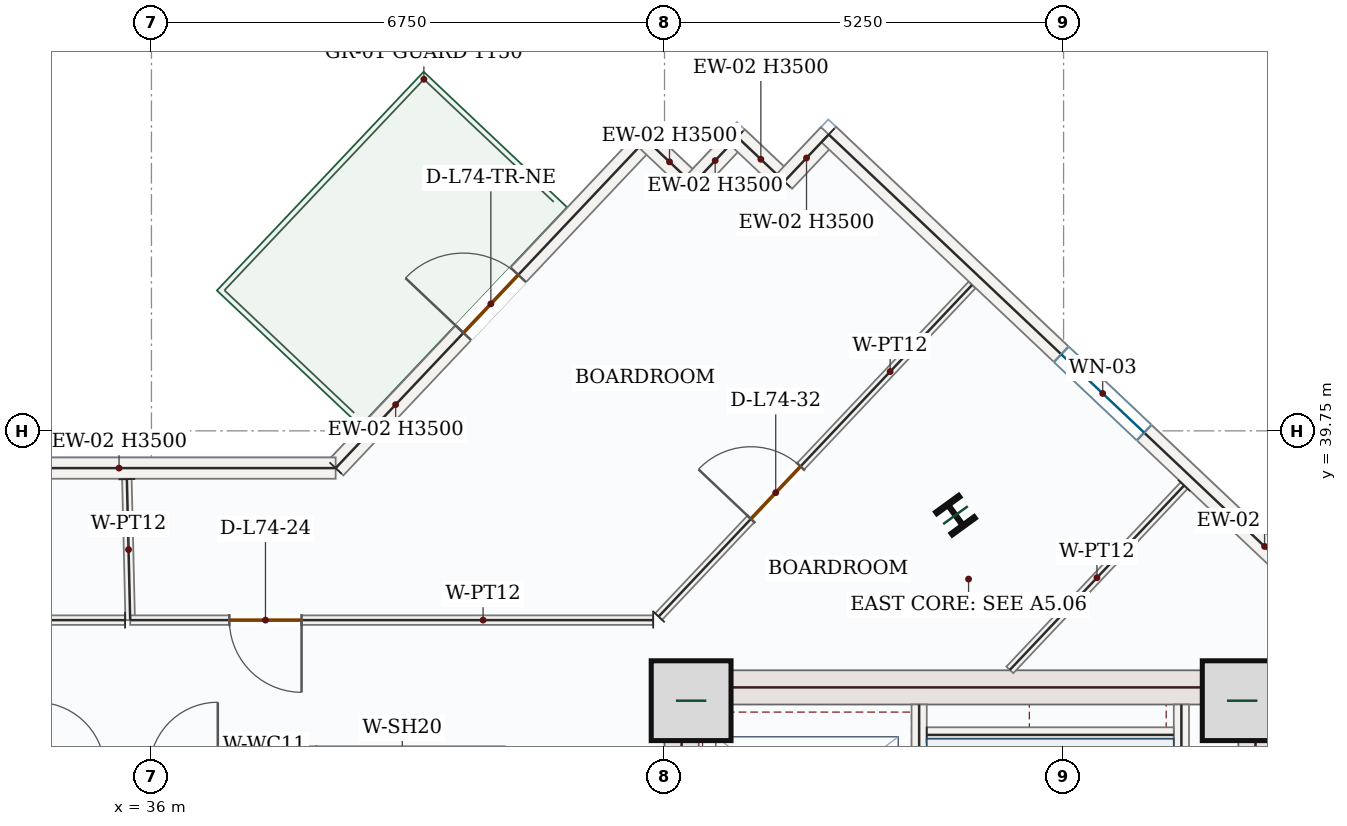
"""IFC4 building model, lengths in metres.
Left out: names, types, materials, properties, quantities, classifications, styles, units other than length and angle.
Written with IfcOpenShell. Run it as: python <this file> out.ifc"""

import sys

from ifc_helpers import new_model, si_unit, direction, frame, frame_2d, origin, origin_2d, place, context, subcontext, project, spatial, rectangle, i_section, extrude, source, transform, mapped, element, fill, save


model = new_model("IFC4")
c1 = context("Model", 3, precision=1e-05, world=origin(), true_north=direction((0.0, 1.0)))
c2 = subcontext(c1, "Body", "Model", "MODEL_VIEW")
j1 = project(units=[si_unit("LENGTHUNIT", "METRE"), si_unit("PLANEANGLEUNIT", "RADIAN")], contexts=[c1])
p1 = place(None, origin())
s1 = spatial("IfcSite", under=j1, at=p1, CompositionType="ELEMENT")
p2 = place(p1, origin())
s2 = spatial("IfcBuilding", under=s1, at=p2, CompositionType="ELEMENT")
p3 = place(p2, frame((0.0, 0.0, 306.6)))
s3 = spatial("IfcBuildingStorey", under=s2, at=p3, CompositionType="ELEMENT", Elevation=306.6)
p4 = place(p3, frame((42.975, 28.05, 0.0), z_axis=(0.0, 0.0, 1.0), x_axis=(0.0, 1.0, 0.0)))
e1 = element("IfcWall", 1, at=p4, inside=s3, PredefinedType="SHEAR", context=c2, shape_type="SweptSolid", body=[
    extrude(rectangle(XDim=8.55, YDim=0.45, at=frame_2d((4.275, 0.0))), origin(), (0.0, 0.0, 1.0), 3.5),
])
p5 = place(p4, frame((1.5, 0.0, 0.0)))
e2 = element("IfcOpeningElement", 2, at=p5, cuts=e1, PredefinedType="OPENING", context=c2, shape_type="SweptSolid", body=[
    extrude(rectangle(XDim=1.1, YDim=2.2, at=frame_2d((0.55, 1.1))), frame((0.0, 0.235, 0.0), z_axis=(0.0, -1.0, 0.0), x_axis=(1.0, 0.0, 0.0)), (0.0, 0.0, 1.0), 0.47),
])
m1 = source(origin(), c2, "Body", "SweptSolid", [
    extrude(rectangle(XDim=8.55, YDim=0.45, at=frame_2d((4.275, 0.0))), origin(), (0.0, 0.0, 1.0), 3.5),
])
p6 = place(p3, frame((50.525, 28.05, 0.0), z_axis=(0.0, 0.0, 1.0), x_axis=(0.0, 1.0, 0.0)))
e3 = element("IfcWall", 3, at=p6, inside=s3, PredefinedType="SHEAR", context=c2, shape_type="MappedRepresentation", body=[
    mapped(m1, transform((0.0, 0.0, 0.0), x_axis=(1.0, 0.0, 0.0), y_axis=(0.0, 1.0, 0.0), z_axis=(0.0, 0.0, 1.0), scale=1.0)),
])
m2 = source(origin(), c2, "Body", "SweptSolid", [
    extrude(rectangle(XDim=7.1, YDim=0.45, at=frame_2d((3.55, 0.0))), origin(), (0.0, 0.0, 1.0), 3.5),
])
p7 = place(p3, frame((43.2, 36.375, 0.0), z_axis=(0.0, 0.0, 1.0), x_axis=(1.0, 0.0, 0.0)))
e4 = element("IfcWall", 4, at=p7, inside=s3, PredefinedType="SHEAR", context=c2, shape_type="MappedRepresentation", body=[
    mapped(m2, transform((0.0, 0.0, 0.0), x_axis=(1.0, 0.0, 0.0), y_axis=(0.0, 1.0, 0.0), z_axis=(0.0, 0.0, 1.0), scale=1.0)),
])
m3 = source(origin(), c2, "Body", "SweptSolid", [
    extrude(rectangle(XDim=1.05, YDim=1.05, at=origin_2d()), origin(), (0.0, 0.0, 1.0), 3.75),
])
for number, where, z_axis, x_axis in (
    (5, (43.1, 36.2, 0.0), (0.0, 0.0, 1.0), (1.0, 0.0, 0.0)),
    (6, (50.35, 36.2, 0.0), (0.0, 0.0, 1.0), (1.0, 0.0, 0.0)),
):
    element("IfcColumn", number, at=place(p3, frame(where, z_axis=z_axis, x_axis=x_axis)), inside=s3, PredefinedType="COLUMN", context=c2, shape_type="MappedRepresentation", body=[
        mapped(m3, transform((0.0, 0.0, 0.0), x_axis=(1.0, 0.0, 0.0), y_axis=(0.0, 1.0, 0.0), z_axis=(0.0, 0.0, 1.0), scale=1.0)),
    ])
m4 = source(origin(), c2, "Body", "SweptSolid", [
    extrude(i_section(OverallWidth=0.374, OverallDepth=0.372, WebThickness=0.016, FlangeThickness=0.026, FilletRadius=0.018, at=origin_2d()), origin(), (0.0, 0.0, 1.0), 3.75),
])
p8 = place(p3, frame((46.578, 38.641, 0.0), z_axis=(0.0, 0.0, 1.0), x_axis=(0.809016994375, 0.587785252292, 0.0)))
e7 = element("IfcColumn", 7, at=p8, inside=s3, PredefinedType="COLUMN", context=c2, shape_type="MappedRepresentation", body=[
    mapped(m4, transform((0.0, 0.0, 0.0), x_axis=(1.0, 0.0, 0.0), y_axis=(0.0, 1.0, 0.0), z_axis=(0.0, 0.0, 1.0), scale=1.0)),
])
p9 = place(p3, frame((38.423, 39.26, 0.0), z_axis=(0.0, 0.0, 1.0), x_axis=(0.686888766374, 0.72676256276, 0.0)))
e8 = element("IfcWall", 8, at=p9, inside=s3, PredefinedType="SOLIDWALL", context=c2, shape_type="SweptSolid", body=[
    extrude(rectangle(XDim=5.945, YDim=0.28, at=frame_2d((2.973, 0.0))), origin(), (0.0, 0.0, 1.0), 3.5),
])
p10 = place(p9, frame((2.448, 0.0, 0.0)))
e9 = element("IfcOpeningElement", 9, at=p10, cuts=e8, PredefinedType="OPENING", context=c2, shape_type="SweptSolid", body=[
    extrude(rectangle(XDim=1.05, YDim=2.15, at=frame_2d((0.525, 1.075))), frame((0.0, 0.15, 0.0), z_axis=(0.0, -1.0, 0.0), x_axis=(1.0, 0.0, 0.0)), (0.0, 0.0, 1.0), 0.3),
])
m5 = source(origin(), c2, "Body", "SweptSolid", [
    extrude(rectangle(XDim=0.85, YDim=0.28, at=frame_2d((0.425, 0.0))), origin(), (0.0, 0.0, 1.0), 3.5),
])
p11 = place(p3, frame((42.507, 43.581, 0.0), z_axis=(0.0, 0.0, 1.0), x_axis=(0.726790047388, -0.686859685101, 0.0)))
e10 = element("IfcWall", 10, at=p11, inside=s3, PredefinedType="SOLIDWALL", context=c2, shape_type="MappedRepresentation", body=[
    mapped(m5, transform((0.0, 0.0, 0.0), x_axis=(1.0, 0.0, 0.0), y_axis=(0.0, 1.0, 0.0), z_axis=(0.0, 0.0, 1.0), scale=1.0)),
])
m6 = source(origin(), c2, "Body", "SweptSolid", [
    extrude(rectangle(XDim=0.85, YDim=0.28, at=frame_2d((0.425, 0.0))), origin(), (0.0, 0.0, 1.0), 3.5),
])
p12 = place(p3, frame((43.125, 42.997, 0.0), z_axis=(0.0, 0.0, 1.0), x_axis=(0.687011382404, 0.726646654466, 0.0)))
e11 = element("IfcWall", 11, at=p12, inside=s3, PredefinedType="SOLIDWALL", context=c2, shape_type="MappedRepresentation", body=[
    mapped(m6, transform((0.0, 0.0, 0.0), x_axis=(1.0, 0.0, 0.0), y_axis=(0.0, 1.0, 0.0), z_axis=(0.0, 0.0, 1.0), scale=1.0)),
])
p13 = place(p3, frame((43.708, 43.615, 0.0), z_axis=(0.0, 0.0, 1.0), x_axis=(0.726790047388, -0.686859685101, 0.0)))
e12 = element("IfcWall", 12, at=p13, inside=s3, PredefinedType="SOLIDWALL", context=c2, shape_type="MappedRepresentation", body=[
    mapped(m5, transform((0.0, 0.0, 0.0), x_axis=(1.0, 0.0, 0.0), y_axis=(0.0, 1.0, 0.0), z_axis=(0.0, 0.0, 1.0), scale=1.0)),
])
p14 = place(p3, frame((44.326, 43.031, 0.0), z_axis=(0.0, 0.0, 1.0), x_axis=(0.687011382404, 0.726646654466, 0.0)))
e13 = element("IfcWall", 13, at=p14, inside=s3, PredefinedType="SOLIDWALL", context=c2, shape_type="MappedRepresentation", body=[
    mapped(m6, transform((0.0, 0.0, 0.0), x_axis=(1.0, 0.0, 0.0), y_axis=(0.0, 1.0, 0.0), z_axis=(0.0, 0.0, 1.0), scale=1.0)),
])
p15 = place(p3, frame((44.91, 43.649, 0.0), z_axis=(0.0, 0.0, 1.0), x_axis=(0.726772856404, -0.686877875022, 0.0)))
e14 = element("IfcWall", 14, at=p15, inside=s3, PredefinedType="SOLIDWALL", context=c2, shape_type="SweptSolid", body=[
    extrude(rectangle(XDim=9.92, YDim=0.28, at=frame_2d((4.96, 0.0))), origin(), (0.0, 0.0, 1.0), 3.5),
])
p16 = place(p15, frame((4.21, 0.0, 0.85)))
e15 = element("IfcOpeningElement", 15, at=p16, cuts=e14, PredefinedType="OPENING", context=c2, shape_type="SweptSolid", body=[
    extrude(rectangle(XDim=1.5, YDim=1.5, at=frame_2d((0.75, 0.75))), frame((0.0, 0.15, 0.0), z_axis=(0.0, -1.0, 0.0), x_axis=(1.0, 0.0, 0.0)), (0.0, 0.0, 1.0), 0.3),
])
m7 = source(origin(), c2, "Body", "SweptSolid", [
    extrude(rectangle(XDim=5.699, YDim=0.28, at=frame_2d((2.85, 0.0))), origin(), (0.0, 0.0, 1.0), 3.5),
])
p17 = place(p3, frame((32.724, 39.26, 0.0), z_axis=(0.0, 0.0, 1.0), x_axis=(1.0, 0.0, 0.0)))
e16 = element("IfcWall", 16, at=p17, inside=s3, PredefinedType="SOLIDWALL", context=c2, shape_type="MappedRepresentation", body=[
    mapped(m7, transform((0.0, 0.0, 0.0), x_axis=(1.0, 0.0, 0.0), y_axis=(0.0, 1.0, 0.0), z_axis=(0.0, 0.0, 1.0), scale=1.0)),
])
m8 = source(origin(), c2, "Body", "SweptSolid", [
    extrude(rectangle(XDim=7.87, YDim=0.2, at=frame_2d((3.935, 0.0))), origin(), (0.0, 0.0, 1.0), 3.5),
])
p18 = place(p3, frame((49.55, 28.28, 0.0), z_axis=(0.0, 0.0, 1.0), x_axis=(0.0, 1.0, 0.0)))
e17 = element("IfcWall", 17, at=p18, inside=s3, PredefinedType="SOLIDWALL", context=c2, shape_type="MappedRepresentation", body=[
    mapped(m8, transform((0.0, 0.0, 0.0), x_axis=(1.0, 0.0, 0.0), y_axis=(0.0, 1.0, 0.0), z_axis=(0.0, 0.0, 1.0), scale=1.0)),
])
p19 = place(p3, frame((46.1, 28.15, 0.0), z_axis=(0.0, 0.0, 1.0), x_axis=(0.0, 1.0, 0.0)))
e18 = element("IfcWall", 18, at=p19, inside=s3, PredefinedType="SOLIDWALL", context=c2, shape_type="SweptSolid", body=[
    extrude(rectangle(XDim=8.0, YDim=0.2, at=frame_2d((4.0, 0.0))), origin(), (0.0, 0.0, 1.0), 3.5),
])
p20 = place(p19, frame((0.4, 0.0, 0.0)))
e19 = element("IfcOpeningElement", 19, at=p20, cuts=e18, PredefinedType="OPENING", context=c2, shape_type="SweptSolid", body=[
    extrude(rectangle(XDim=1.05, YDim=2.15, at=frame_2d((0.525, 1.075))), frame((0.0, 0.11, 0.0), z_axis=(0.0, -1.0, 0.0), x_axis=(1.0, 0.0, 0.0)), (0.0, 0.0, 1.0), 0.22),
])
m9 = source(origin(), c2, "Body", "SweptSolid", [
    extrude(rectangle(XDim=3.25, YDim=0.2, at=frame_2d((1.625, 0.0))), origin(), (0.0, 0.0, 1.0), 3.5),
])
p21 = place(p3, frame((46.2, 35.75, 0.0), z_axis=(0.0, 0.0, 1.0), x_axis=(1.0, 0.0, 0.0)))
e20 = element("IfcWall", 20, at=p21, inside=s3, PredefinedType="SOLIDWALL", context=c2, shape_type="MappedRepresentation", body=[
    mapped(m9, transform((0.0, 0.0, 0.0), x_axis=(1.0, 0.0, 0.0), y_axis=(0.0, 1.0, 0.0), z_axis=(0.0, 0.0, 1.0), scale=1.0)),
])
m10 = source(origin(), c2, "Body", "SweptSolid", [
    extrude(rectangle(XDim=2.4, YDim=0.2, at=frame_2d((1.2, 0.0))), origin(), (0.0, 0.0, 1.0), 3.5),
])
p22 = place(p3, frame((38.05, 33.2, 0.0), z_axis=(0.0, 0.0, 1.0), x_axis=(0.0, 1.0, 0.0)))
e21 = element("IfcWall", 21, at=p22, inside=s3, PredefinedType="SOLIDWALL", context=c2, shape_type="MappedRepresentation", body=[
    mapped(m10, transform((0.0, 0.0, 0.0), x_axis=(1.0, 0.0, 0.0), y_axis=(0.0, 1.0, 0.0), z_axis=(0.0, 0.0, 1.0), scale=1.0)),
])
p23 = place(p3, frame((40.55, 33.2, 0.0), z_axis=(0.0, 0.0, 1.0), x_axis=(0.0, 1.0, 0.0)))
e22 = element("IfcWall", 22, at=p23, inside=s3, PredefinedType="SOLIDWALL", context=c2, shape_type="SweptSolid", body=[
    extrude(rectangle(XDim=2.4, YDim=0.2, at=frame_2d((1.2, 0.0))), origin(), (0.0, 0.0, 1.0), 3.5),
])
p24 = place(p23, frame((0.65, 0.0, 0.0)))
e23 = element("IfcOpeningElement", 23, at=p24, cuts=e22, PredefinedType="OPENING", context=c2, shape_type="SweptSolid", body=[
    extrude(rectangle(XDim=1.1, YDim=2.15, at=frame_2d((0.55, 1.075))), frame((0.0, 0.11, 0.0), z_axis=(0.0, -1.0, 0.0), x_axis=(1.0, 0.0, 0.0)), (0.0, 0.0, 1.0), 0.22),
])
m11 = source(origin(), c2, "Body", "SweptSolid", [
    extrude(rectangle(XDim=3.337, YDim=0.125, at=frame_2d((1.669, 0.0))), origin(), (0.0, 0.0, 1.0), 3.5),
])
p25 = place(p3, frame((49.585, 39.031, 0.0), z_axis=(0.0, 0.0, 1.0), x_axis=(-0.686891986515, -0.726759519278, 0.0)))
e24 = element("IfcWall", 24, at=p25, inside=s3, PredefinedType="PARTITIONING", context=c2, shape_type="MappedRepresentation", body=[
    mapped(m11, transform((0.0, 0.0, 0.0), x_axis=(1.0, 0.0, 0.0), y_axis=(0.0, 1.0, 0.0), z_axis=(0.0, 0.0, 1.0), scale=1.0)),
])
p26 = place(p3, frame((42.672, 37.306, 0.0), z_axis=(0.0, 0.0, 1.0), x_axis=(0.686871949206, 0.726778456886, 0.0)))
e25 = element("IfcWall", 25, at=p26, inside=s3, PredefinedType="PARTITIONING", context=c2, shape_type="SweptSolid", body=[
    extrude(rectangle(XDim=6.001, YDim=0.125, at=frame_2d((3.001, 0.0))), origin(), (0.0, 0.0, 1.0), 3.5),
])
p27 = place(p26, frame((1.768, 0.0, 0.0)))
e26 = element("IfcOpeningElement", 26, at=p27, cuts=e25, PredefinedType="OPENING", context=c2, shape_type="SweptSolid", body=[
    extrude(rectangle(XDim=0.95, YDim=2.15, at=frame_2d((0.475, 1.075))), frame((0.0, 0.073, 0.0), z_axis=(0.0, -1.0, 0.0), x_axis=(1.0, 0.0, 0.0)), (0.0, 0.0, 1.0), 0.145),
])
m12 = source(origin(), c2, "Body", "SweptSolid", [
    extrude(rectangle(XDim=1.855, YDim=0.125, at=frame_2d((0.928, 0.0))), origin(), (0.0, 0.0, 1.0), 3.5),
])
p28 = place(p3, frame((35.677, 39.115, 0.0), z_axis=(0.0, 0.0, 1.0), x_axis=(0.023420791501, -0.999725695641, 0.0)))
e27 = element("IfcWall", 27, at=p28, inside=s3, PredefinedType="PARTITIONING", context=c2, shape_type="MappedRepresentation", body=[
    mapped(m12, transform((0.0, 0.0, 0.0), x_axis=(1.0, 0.0, 0.0), y_axis=(0.0, 1.0, 0.0), z_axis=(0.0, 0.0, 1.0), scale=1.0)),
])
p29 = place(p3, frame((35.653, 37.26, 0.0), z_axis=(0.0, 0.0, 1.0), x_axis=(-0.999999997089, -7.6303842e-05, 0.0)))
e28 = element("IfcWall", 28, at=p29, inside=s3, PredefinedType="PARTITIONING", context=c2, shape_type="SweptSolid", body=[
    extrude(rectangle(XDim=6.399, YDim=0.125, at=frame_2d((3.2, 0.0))), origin(), (0.0, 0.0, 1.0), 3.5),
])
p30 = place(p29, frame((1.199, 0.0, 0.0)))
e29 = element("IfcOpeningElement", 29, at=p30, cuts=e28, PredefinedType="OPENING", context=c2, shape_type="SweptSolid", body=[
    extrude(rectangle(XDim=0.95, YDim=2.15, at=frame_2d((0.475, 1.075))), frame((0.0, 0.073, 0.0), z_axis=(0.0, -1.0, 0.0), x_axis=(1.0, 0.0, 0.0)), (0.0, 0.0, 1.0), 0.145),
])
p31 = place(p3, frame((42.601, 37.26, 0.0), z_axis=(0.0, 0.0, 1.0), x_axis=(-1.0, 0.0, 0.0)))
e30 = element("IfcWall", 30, at=p31, inside=s3, PredefinedType="PARTITIONING", context=c2, shape_type="SweptSolid", body=[
    extrude(rectangle(XDim=6.881, YDim=0.125, at=frame_2d((3.44, 0.0))), origin(), (0.0, 0.0, 1.0), 3.5),
])
p32 = place(p31, frame((4.626, 0.0, 0.0)))
e31 = element("IfcOpeningElement", 31, at=p32, cuts=e30, PredefinedType="OPENING", context=c2, shape_type="SweptSolid", body=[
    extrude(rectangle(XDim=0.95, YDim=2.15, at=frame_2d((0.475, 1.075))), frame((0.0, 0.073, 0.0), z_axis=(0.0, -1.0, 0.0), x_axis=(1.0, 0.0, 0.0)), (0.0, 0.0, 1.0), 0.145),
])
m13 = source(origin(), c2, "Body", "SweptSolid", [
    extrude(rectangle(XDim=1.05, YDim=2.15, at=frame_2d((0.525, 1.075))), frame((0.0, 0.025, 0.0), z_axis=(0.0, -1.0, 0.0), x_axis=(1.0, 0.0, 0.0)), (0.0, 0.0, 1.0), 0.05),
])
p33 = place(p10, origin())
e32 = element("IfcDoor", 32, at=p33, inside=s3, OperationType="SINGLE_SWING_LEFT", PredefinedType="DOOR", context=c2, shape_type="MappedRepresentation", body=[
    mapped(m13, transform((0.0, 0.0, 0.0), x_axis=(1.0, 0.0, 0.0), y_axis=(0.0, 1.0, 0.0), z_axis=(0.0, 0.0, 1.0), scale=1.0)),
])
fill(e9, e32)
m14 = source(origin(), c2, "Body", "SweptSolid", [
    extrude(rectangle(XDim=1.5, YDim=1.5, at=frame_2d((0.75, 0.75))), frame((0.0, 0.03, 0.0), z_axis=(0.0, -1.0, 0.0), x_axis=(1.0, 0.0, 0.0)), (0.0, 0.0, 1.0), 0.06),
])
p34 = place(p16, origin())
e33 = element("IfcWindow", 33, at=p34, inside=s3, PartitioningType="SINGLE_PANEL", PredefinedType="WINDOW", context=c2, shape_type="MappedRepresentation", body=[
    mapped(m14, transform((0.0, 0.0, 0.0), x_axis=(1.0, 0.0, 0.0), y_axis=(0.0, 1.0, 0.0), z_axis=(0.0, 0.0, 1.0), scale=1.0)),
])
fill(e15, e33)
m15 = source(origin(), c2, "Body", "SweptSolid", [
    extrude(rectangle(XDim=0.95, YDim=2.15, at=frame_2d((0.475, 1.075))), frame((0.0, 0.025, 0.0), z_axis=(0.0, -1.0, 0.0), x_axis=(1.0, 0.0, 0.0)), (0.0, 0.0, 1.0), 0.05),
])
p35 = place(p32, origin())
e34 = element("IfcDoor", 34, at=p35, inside=s3, OperationType="SINGLE_SWING_LEFT", PredefinedType="DOOR", context=c2, shape_type="MappedRepresentation", body=[
    mapped(m15, transform((0.0, 0.0, 0.0), x_axis=(1.0, 0.0, 0.0), y_axis=(0.0, 1.0, 0.0), z_axis=(0.0, 0.0, 1.0), scale=1.0)),
])
fill(e31, e34)
p36 = place(p27, origin())
e35 = element("IfcDoor", 35, at=p36, inside=s3, OperationType="SINGLE_SWING_LEFT", PredefinedType="DOOR", context=c2, shape_type="MappedRepresentation", body=[
    mapped(m15, transform((0.0, 0.0, 0.0), x_axis=(1.0, 0.0, 0.0), y_axis=(0.0, 1.0, 0.0), z_axis=(0.0, 0.0, 1.0), scale=1.0)),
])
fill(e26, e35)
save(model, sys.argv[1])
